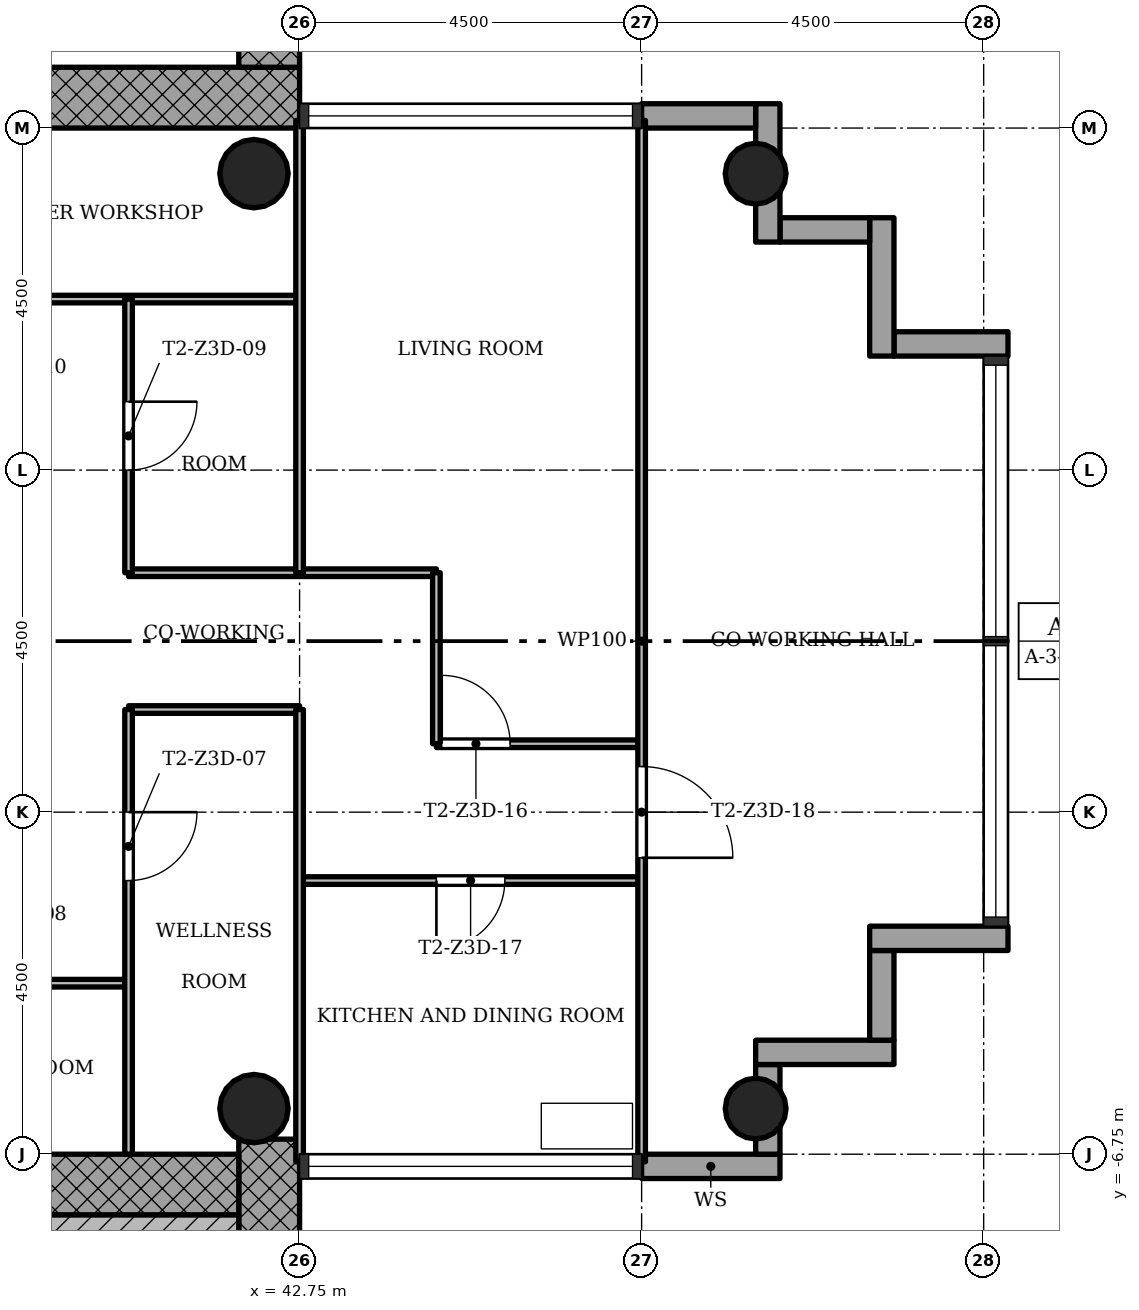
"""IFC4 building model, lengths in metres.
Left out: names, types, materials, properties, quantities, classifications, styles, units other than length and angle.
Written with IfcOpenShell. Run it as: python <this file> out.ifc"""

import sys

from ifc_helpers import new_model, si_unit, direction, frame, frame_2d, origin, origin_2d, place, context, subcontext, project, spatial, rectangle, hollow_circle, extrude, element, fill, save


model = new_model("IFC4")
c1 = context("Model", 3, precision=1e-05, world=origin(), true_north=direction((0.0, 1.0)))
c2 = subcontext(c1, "Body", "Model", "MODEL_VIEW")
j1 = project(units=[si_unit("LENGTHUNIT", "METRE"), si_unit("PLANEANGLEUNIT", "RADIAN")], contexts=[c1])
p1 = place(None, origin())
s1 = spatial("IfcSite", under=j1, at=p1, CompositionType="ELEMENT")
p2 = place(p1, origin())
s2 = spatial("IfcBuilding", under=s1, at=p2, CompositionType="ELEMENT")
p3 = place(p2, frame((0.0, 0.0, 174.5)))
s3 = spatial("IfcBuildingStorey", under=s2, at=p3, CompositionType="ELEMENT", Elevation=174.5)
p4 = place(p3, frame((30.05, 7.15, 0.0), z_axis=(0.0, 0.0, 1.0), x_axis=(1.0, 0.0, 0.0)))
e1 = element("IfcWall", 1, at=p4, inside=s3, PredefinedType="SHEAR", context=c2, shape_type="SweptSolid", body=[
    extrude(rectangle(XDim=12.7, YDim=0.8, at=frame_2d((6.35, 0.0))), origin(), (0.0, 0.0, 1.0), 3.4),
])
p5 = place(p4, frame((5.05, 0.0, 0.0)))
e2 = element("IfcOpeningElement", 2, at=p5, cuts=e1, PredefinedType="OPENING", context=c2, shape_type="SweptSolid", body=[
    extrude(rectangle(XDim=1.8, YDim=2.1, at=frame_2d((0.9, 1.05))), frame((0.0, 0.41, 0.0), z_axis=(0.0, -1.0, 0.0), x_axis=(1.0, 0.0, 0.0)), (0.0, 0.0, 1.0), 0.82),
])
p6 = place(p3, frame((42.35, 7.55, 0.0), z_axis=(0.0, 0.0, 1.0), x_axis=(0.0, 1.0, 0.0)))
e3 = element("IfcWall", 3, at=p6, inside=s3, PredefinedType="SHEAR", context=c2, shape_type="SweptSolid", body=[
    extrude(rectangle(XDim=8.2, YDim=0.8, at=frame_2d((4.1, 0.0))), origin(), (0.0, 0.0, 1.0), 3.4),
])
p7 = place(p3, frame((42.35, -14.95, 0.0), z_axis=(0.0, 0.0, 1.0), x_axis=(0.0, 1.0, 0.0)))
e4 = element("IfcWall", 4, at=p7, inside=s3, PredefinedType="SHEAR", context=c2, shape_type="SweptSolid", body=[
    extrude(rectangle(XDim=8.398, YDim=0.8, at=frame_2d((4.199, 0.0))), origin(), (0.0, 0.0, 1.0), 3.4),
])
p8 = place(p3, frame((41.95, -7.15, 0.0), z_axis=(0.0, 0.0, 1.0), x_axis=(-1.0, 0.0, 0.0)))
e5 = element("IfcWall", 5, at=p8, inside=s3, PredefinedType="SHEAR", context=c2, shape_type="SweptSolid", body=[
    extrude(rectangle(XDim=12.7, YDim=0.8, at=frame_2d((6.35, 0.0))), origin(), (0.0, 0.0, 1.0), 3.4),
])
p9 = place(p8, frame((5.05, 0.0, 0.0)))
e6 = element("IfcOpeningElement", 6, at=p9, cuts=e5, PredefinedType="OPENING", context=c2, shape_type="SweptSolid", body=[
    extrude(rectangle(XDim=1.8, YDim=2.1, at=frame_2d((0.9, 1.05))), frame((0.0, 0.41, 0.0), z_axis=(0.0, -1.0, 0.0), x_axis=(1.0, 0.0, 0.0)), (0.0, 0.0, 1.0), 0.82),
])
for number, where, z_axis, x_axis in (
    (7, (48.75, -6.15, 0.0), (0.0, 0.0, 1.0), (1.0, 0.0, 0.0)),
    (8, (48.75, 6.15, 0.0), (0.0, 0.0, 1.0), (1.0, 0.0, 0.0)),
):
    element("IfcColumn", number, at=place(p3, frame(where, z_axis=z_axis, x_axis=x_axis)), inside=s3, PredefinedType="COLUMN", context=c2, shape_type="SweptSolid", body=[
        extrude(hollow_circle(Radius=0.4, WallThickness=0.028, at=origin_2d()), origin(), (0.0, 0.0, 1.0), 3.4),
    ])
for number, where, z_axis, x_axis in (
    (9, (42.15, -6.15, 0.0), (0.0, 0.0, 1.0), (1.0, 0.0, 0.0)),
    (10, (42.15, 6.15, 0.0), (0.0, 0.0, 1.0), (1.0, 0.0, 0.0)),
):
    element("IfcColumn", number, at=place(p3, frame(where, z_axis=z_axis, x_axis=x_axis)), inside=s3, PredefinedType="COLUMN", context=c2, shape_type="SweptSolid", body=[
        extrude(hollow_circle(Radius=0.45, WallThickness=0.032, at=origin_2d()), origin(), (0.0, 0.0, 1.0), 3.4),
    ])
p10 = place(p3, frame((47.25, -6.91, -0.3), z_axis=(0.0, 0.0, 1.0), x_axis=(1.0, 0.0, 0.0)))
e11 = element("IfcWall", 11, at=p10, inside=s3, PredefinedType="STANDARD", context=c2, shape_type="SweptSolid", body=[
    extrude(rectangle(XDim=1.82, YDim=0.32, at=frame_2d((0.91, 0.0))), origin(), (0.0, 0.0, 1.0), 3.4),
])
p11 = place(p3, frame((48.91, -6.75, -0.3), z_axis=(0.0, 0.0, 1.0), x_axis=(0.0, 1.0, 0.0)))
e12 = element("IfcWall", 12, at=p11, inside=s3, PredefinedType="STANDARD", context=c2, shape_type="SweptSolid", body=[
    extrude(rectangle(XDim=1.18, YDim=0.32, at=frame_2d((0.59, 0.0))), origin(), (0.0, 0.0, 1.0), 3.4),
])
p12 = place(p3, frame((48.75, -5.41, -0.3), z_axis=(0.0, 0.0, 1.0), x_axis=(1.0, 0.0, 0.0)))
e13 = element("IfcWall", 13, at=p12, inside=s3, PredefinedType="STANDARD", context=c2, shape_type="SweptSolid", body=[
    extrude(rectangle(XDim=1.82, YDim=0.32, at=frame_2d((0.91, 0.0))), origin(), (0.0, 0.0, 1.0), 3.4),
])
p13 = place(p3, frame((50.41, -5.25, -0.3), z_axis=(0.0, 0.0, 1.0), x_axis=(0.0, 1.0, 0.0)))
e14 = element("IfcWall", 14, at=p13, inside=s3, PredefinedType="STANDARD", context=c2, shape_type="SweptSolid", body=[
    extrude(rectangle(XDim=1.18, YDim=0.32, at=frame_2d((0.59, 0.0))), origin(), (0.0, 0.0, 1.0), 3.4),
])
p14 = place(p3, frame((50.25, -3.91, -0.3), z_axis=(0.0, 0.0, 1.0), x_axis=(1.0, 0.0, 0.0)))
e15 = element("IfcWall", 15, at=p14, inside=s3, PredefinedType="STANDARD", context=c2, shape_type="SweptSolid", body=[
    extrude(rectangle(XDim=1.82, YDim=0.32, at=frame_2d((0.91, 0.0))), origin(), (0.0, 0.0, 1.0), 3.4),
])
p15 = place(p3, frame((52.07, 3.91, -0.3), z_axis=(0.0, 0.0, 1.0), x_axis=(-1.0, 0.0, 0.0)))
e16 = element("IfcWall", 16, at=p15, inside=s3, PredefinedType="STANDARD", context=c2, shape_type="SweptSolid", body=[
    extrude(rectangle(XDim=1.5, YDim=0.32, at=frame_2d((0.75, 0.0))), origin(), (0.0, 0.0, 1.0), 3.4),
])
p16 = place(p3, frame((50.41, 3.75, -0.3), z_axis=(0.0, 0.0, 1.0), x_axis=(0.0, 1.0, 0.0)))
e17 = element("IfcWall", 17, at=p16, inside=s3, PredefinedType="STANDARD", context=c2, shape_type="SweptSolid", body=[
    extrude(rectangle(XDim=1.82, YDim=0.32, at=frame_2d((0.91, 0.0))), origin(), (0.0, 0.0, 1.0), 3.4),
])
p17 = place(p3, frame((50.25, 5.41, -0.3), z_axis=(0.0, 0.0, 1.0), x_axis=(-1.0, 0.0, 0.0)))
e18 = element("IfcWall", 18, at=p17, inside=s3, PredefinedType="STANDARD", context=c2, shape_type="SweptSolid", body=[
    extrude(rectangle(XDim=1.18, YDim=0.32, at=frame_2d((0.59, 0.0))), origin(), (0.0, 0.0, 1.0), 3.4),
])
p18 = place(p3, frame((48.91, 5.25, -0.3), z_axis=(0.0, 0.0, 1.0), x_axis=(0.0, 1.0, 0.0)))
e19 = element("IfcWall", 19, at=p18, inside=s3, PredefinedType="STANDARD", context=c2, shape_type="SweptSolid", body=[
    extrude(rectangle(XDim=1.82, YDim=0.32, at=frame_2d((0.91, 0.0))), origin(), (0.0, 0.0, 1.0), 3.4),
])
p19 = place(p3, frame((48.75, 6.91, -0.3), z_axis=(0.0, 0.0, 1.0), x_axis=(-1.0, 0.0, 0.0)))
e20 = element("IfcWall", 20, at=p19, inside=s3, PredefinedType="STANDARD", context=c2, shape_type="SweptSolid", body=[
    extrude(rectangle(XDim=1.5, YDim=0.32, at=frame_2d((0.75, 0.0))), origin(), (0.0, 0.0, 1.0), 3.4),
])
p20 = place(p3, frame((40.5, -4.5, 0.0), z_axis=(0.0, 0.0, 1.0), x_axis=(-1.0, 0.0, 0.0)))
e21 = element("IfcWall", 21, at=p20, inside=s3, PredefinedType="PARTITIONING", context=c2, shape_type="SweptSolid", body=[
    extrude(rectangle(XDim=3.0, YDim=0.1, at=frame_2d((1.5, 0.0))), origin(), (0.0, 0.0, 1.0), 3.0),
])
p21 = place(p20, frame((1.05, 0.0, 0.0)))
e22 = element("IfcOpeningElement", 22, at=p21, cuts=e21, PredefinedType="OPENING", context=c2, shape_type="SweptSolid", body=[
    extrude(rectangle(XDim=0.9, YDim=2.1, at=frame_2d((0.45, 1.05))), frame((0.0, 0.06, 0.0), z_axis=(0.0, -1.0, 0.0), x_axis=(1.0, 0.0, 0.0)), (0.0, 0.0, 1.0), 0.12),
])
p22 = place(p3, frame((47.25, -3.15, 0.0), z_axis=(0.0, 0.0, 1.0), x_axis=(-1.0, 0.0, 0.0)))
e23 = element("IfcWall", 23, at=p22, inside=s3, PredefinedType="PARTITIONING", context=c2, shape_type="SweptSolid", body=[
    extrude(rectangle(XDim=4.5, YDim=0.1, at=frame_2d((2.25, 0.0))), origin(), (0.0, 0.0, 1.0), 3.0),
])
p23 = place(p22, frame((1.8, 0.0, 0.0)))
e24 = element("IfcOpeningElement", 24, at=p23, cuts=e23, PredefinedType="OPENING", context=c2, shape_type="SweptSolid", body=[
    extrude(rectangle(XDim=0.9, YDim=2.1, at=frame_2d((0.45, 1.05))), frame((0.0, 0.06, 0.0), z_axis=(0.0, -1.0, 0.0), x_axis=(1.0, 0.0, 0.0)), (0.0, 0.0, 1.0), 0.12),
])
p24 = place(p3, frame((47.25, -1.35, 0.0), z_axis=(0.0, 0.0, 1.0), x_axis=(-1.0, 0.0, 0.0)))
e25 = element("IfcWall", 25, at=p24, inside=s3, PredefinedType="PARTITIONING", context=c2, shape_type="SweptSolid", body=[
    extrude(rectangle(XDim=2.7, YDim=0.1, at=frame_2d((1.35, 0.0))), origin(), (0.0, 0.0, 1.0), 3.0),
])
p25 = place(p24, frame((1.73, 0.0, 0.0)))
e26 = element("IfcOpeningElement", 26, at=p25, cuts=e25, PredefinedType="OPENING", context=c2, shape_type="SweptSolid", body=[
    extrude(rectangle(XDim=0.9, YDim=2.1, at=frame_2d((0.45, 1.05))), frame((0.0, 0.06, 0.0), z_axis=(0.0, -1.0, 0.0), x_axis=(1.0, 0.0, 0.0)), (0.0, 0.0, 1.0), 0.12),
])
p26 = place(p3, frame((42.75, -0.9, 0.0), z_axis=(0.0, 0.0, 1.0), x_axis=(-1.0, 0.0, 0.0)))
e27 = element("IfcWall", 27, at=p26, inside=s3, PredefinedType="PARTITIONING", context=c2, shape_type="SweptSolid", body=[
    extrude(rectangle(XDim=2.25, YDim=0.1, at=frame_2d((1.125, 0.0))), origin(), (0.0, 0.0, 1.0), 3.0),
])
p27 = place(p3, frame((44.55, 0.9, 0.0), z_axis=(0.0, 0.0, 1.0), x_axis=(-1.0, 0.0, 0.0)))
e28 = element("IfcWall", 28, at=p27, inside=s3, PredefinedType="PARTITIONING", context=c2, shape_type="SweptSolid", body=[
    extrude(rectangle(XDim=4.05, YDim=0.1, at=frame_2d((2.025, 0.0))), origin(), (0.0, 0.0, 1.0), 3.0),
])
p28 = place(p3, frame((42.75, 4.5, 0.0), z_axis=(0.0, 0.0, 1.0), x_axis=(-1.0, 0.0, 0.0)))
e29 = element("IfcWall", 29, at=p28, inside=s3, PredefinedType="PARTITIONING", context=c2, shape_type="SweptSolid", body=[
    extrude(rectangle(XDim=5.25, YDim=0.1, at=frame_2d((2.625, 0.0))), origin(), (0.0, 0.0, 1.0), 3.0),
])
p29 = place(p28, frame((3.3, 0.0, 0.0)))
e30 = element("IfcOpeningElement", 30, at=p29, cuts=e29, PredefinedType="OPENING", context=c2, shape_type="SweptSolid", body=[
    extrude(rectangle(XDim=0.9, YDim=2.1, at=frame_2d((0.45, 1.05))), frame((0.0, 0.06, 0.0), z_axis=(0.0, -1.0, 0.0), x_axis=(1.0, 0.0, 0.0)), (0.0, 0.0, 1.0), 0.12),
])
p30 = place(p3, frame((47.25, -6.85, 0.0), z_axis=(0.0, 0.0, 1.0), x_axis=(0.0, 1.0, 0.0)))
e31 = element("IfcWall", 31, at=p30, inside=s3, PredefinedType="PARTITIONING", context=c2, shape_type="SweptSolid", body=[
    extrude(rectangle(XDim=13.7, YDim=0.1, at=frame_2d((6.85, 0.0))), origin(), (0.0, 0.0, 1.0), 3.0),
])
p31 = place(p30, frame((4.0, 0.0, 0.0)))
e32 = element("IfcOpeningElement", 32, at=p31, cuts=e31, PredefinedType="OPENING", context=c2, shape_type="SweptSolid", body=[
    extrude(rectangle(XDim=1.2, YDim=2.1, at=frame_2d((0.6, 1.05))), frame((0.0, 0.06, 0.0), z_axis=(0.0, -1.0, 0.0), x_axis=(1.0, 0.0, 0.0)), (0.0, 0.0, 1.0), 0.12),
])
p32 = place(p3, frame((44.55, -1.35, 0.0), z_axis=(0.0, 0.0, 1.0), x_axis=(0.0, 1.0, 0.0)))
e33 = element("IfcWall", 33, at=p32, inside=s3, PredefinedType="PARTITIONING", context=c2, shape_type="SweptSolid", body=[
    extrude(rectangle(XDim=2.25, YDim=0.1, at=frame_2d((1.125, 0.0))), origin(), (0.0, 0.0, 1.0), 3.0),
])
for number, where, z_axis, x_axis in (
    (34, (42.75, -6.85, 0.0), (0.0, 0.0, 1.0), (0.0, 1.0, 0.0)),
    (35, (42.75, 0.9, 0.0), (0.0, 0.0, 1.0), (0.0, 1.0, 0.0)),
):
    element("IfcWall", number, at=place(p3, frame(where, z_axis=z_axis, x_axis=x_axis)), inside=s3, PredefinedType="PARTITIONING", context=c2, shape_type="SweptSolid", body=[
        extrude(rectangle(XDim=5.95, YDim=0.1, at=frame_2d((2.975, 0.0))), origin(), (0.0, 0.0, 1.0), 3.0),
    ])
p33 = place(p3, frame((40.5, -6.75, 0.0), z_axis=(0.0, 0.0, 1.0), x_axis=(0.0, 1.0, 0.0)))
e36 = element("IfcWall", 36, at=p33, inside=s3, PredefinedType="PARTITIONING", context=c2, shape_type="SweptSolid", body=[
    extrude(rectangle(XDim=5.85, YDim=0.1, at=frame_2d((2.925, 0.0))), origin(), (0.0, 0.0, 1.0), 3.0),
])
p34 = place(p33, frame((3.6, 0.0, 0.0)))
e37 = element("IfcOpeningElement", 37, at=p34, cuts=e36, PredefinedType="OPENING", context=c2, shape_type="SweptSolid", body=[
    extrude(rectangle(XDim=0.9, YDim=2.1, at=frame_2d((0.45, 1.05))), frame((0.0, 0.06, 0.0), z_axis=(0.0, -1.0, 0.0), x_axis=(1.0, 0.0, 0.0)), (0.0, 0.0, 1.0), 0.12),
])
p35 = place(p3, frame((40.5, 0.9, 0.0), z_axis=(0.0, 0.0, 1.0), x_axis=(0.0, 1.0, 0.0)))
e38 = element("IfcWall", 38, at=p35, inside=s3, PredefinedType="PARTITIONING", context=c2, shape_type="SweptSolid", body=[
    extrude(rectangle(XDim=3.6, YDim=0.1, at=frame_2d((1.8, 0.0))), origin(), (0.0, 0.0, 1.0), 3.0),
])
p36 = place(p35, frame((1.35, 0.0, 0.0)))
e39 = element("IfcOpeningElement", 39, at=p36, cuts=e38, PredefinedType="OPENING", context=c2, shape_type="SweptSolid", body=[
    extrude(rectangle(XDim=0.9, YDim=2.1, at=frame_2d((0.45, 1.05))), frame((0.0, 0.06, 0.0), z_axis=(0.0, -1.0, 0.0), x_axis=(1.0, 0.0, 0.0)), (0.0, 0.0, 1.0), 0.12),
])
p37 = place(p3, frame((37.85, -7.75, 0.0), z_axis=(0.0, 0.0, 1.0), x_axis=(1.0, 0.0, 0.0)))
e40 = element("IfcWall", 40, at=p37, inside=s3, PredefinedType="SHEAR", context=c2, shape_type="SweptSolid", body=[
    extrude(rectangle(XDim=4.1, YDim=0.4, at=frame_2d((2.05, 0.0))), origin(), (0.0, 0.0, 1.0), 3.4),
])
p38 = place(p34, origin())
e41 = element("IfcDoor", 41, at=p38, inside=s3, OperationType="SINGLE_SWING_RIGHT", PredefinedType="DOOR", context=c2, shape_type="SweptSolid", body=[
    extrude(rectangle(XDim=0.9, YDim=2.1, at=frame_2d((0.45, 1.05))), frame((0.0, 0.025, 0.0), z_axis=(0.0, -1.0, 0.0), x_axis=(1.0, 0.0, 0.0)), (0.0, 0.0, 1.0), 0.05),
])
fill(e37, e41)
p39 = place(p36, origin())
e42 = element("IfcDoor", 42, at=p39, inside=s3, OperationType="SINGLE_SWING_RIGHT", PredefinedType="DOOR", context=c2, shape_type="SweptSolid", body=[
    extrude(rectangle(XDim=0.9, YDim=2.1, at=frame_2d((0.45, 1.05))), frame((0.0, 0.025, 0.0), z_axis=(0.0, -1.0, 0.0), x_axis=(1.0, 0.0, 0.0)), (0.0, 0.0, 1.0), 0.05),
])
fill(e39, e42)
p40 = place(p25, origin())
e43 = element("IfcDoor", 43, at=p40, inside=s3, OperationType="SINGLE_SWING_RIGHT", PredefinedType="DOOR", context=c2, shape_type="SweptSolid", body=[
    extrude(rectangle(XDim=0.9, YDim=2.1, at=frame_2d((0.45, 1.05))), frame((0.0, 0.025, 0.0), z_axis=(0.0, -1.0, 0.0), x_axis=(1.0, 0.0, 0.0)), (0.0, 0.0, 1.0), 0.05),
])
fill(e26, e43)
p41 = place(p23, origin())
e44 = element("IfcDoor", 44, at=p41, inside=s3, OperationType="SINGLE_SWING_LEFT", PredefinedType="DOOR", context=c2, shape_type="SweptSolid", body=[
    extrude(rectangle(XDim=0.9, YDim=2.1, at=frame_2d((0.45, 1.05))), frame((0.0, 0.025, 0.0), z_axis=(0.0, -1.0, 0.0), x_axis=(1.0, 0.0, 0.0)), (0.0, 0.0, 1.0), 0.05),
])
fill(e24, e44)
p42 = place(p31, origin())
e45 = element("IfcDoor", 45, at=p42, inside=s3, OperationType="SINGLE_SWING_LEFT", PredefinedType="DOOR", context=c2, shape_type="SweptSolid", body=[
    extrude(rectangle(XDim=1.2, YDim=2.1, at=frame_2d((0.6, 1.05))), frame((0.0, 0.025, 0.0), z_axis=(0.0, -1.0, 0.0), x_axis=(1.0, 0.0, 0.0)), (0.0, 0.0, 1.0), 0.05),
])
fill(e32, e45)
save(model, sys.argv[1])
